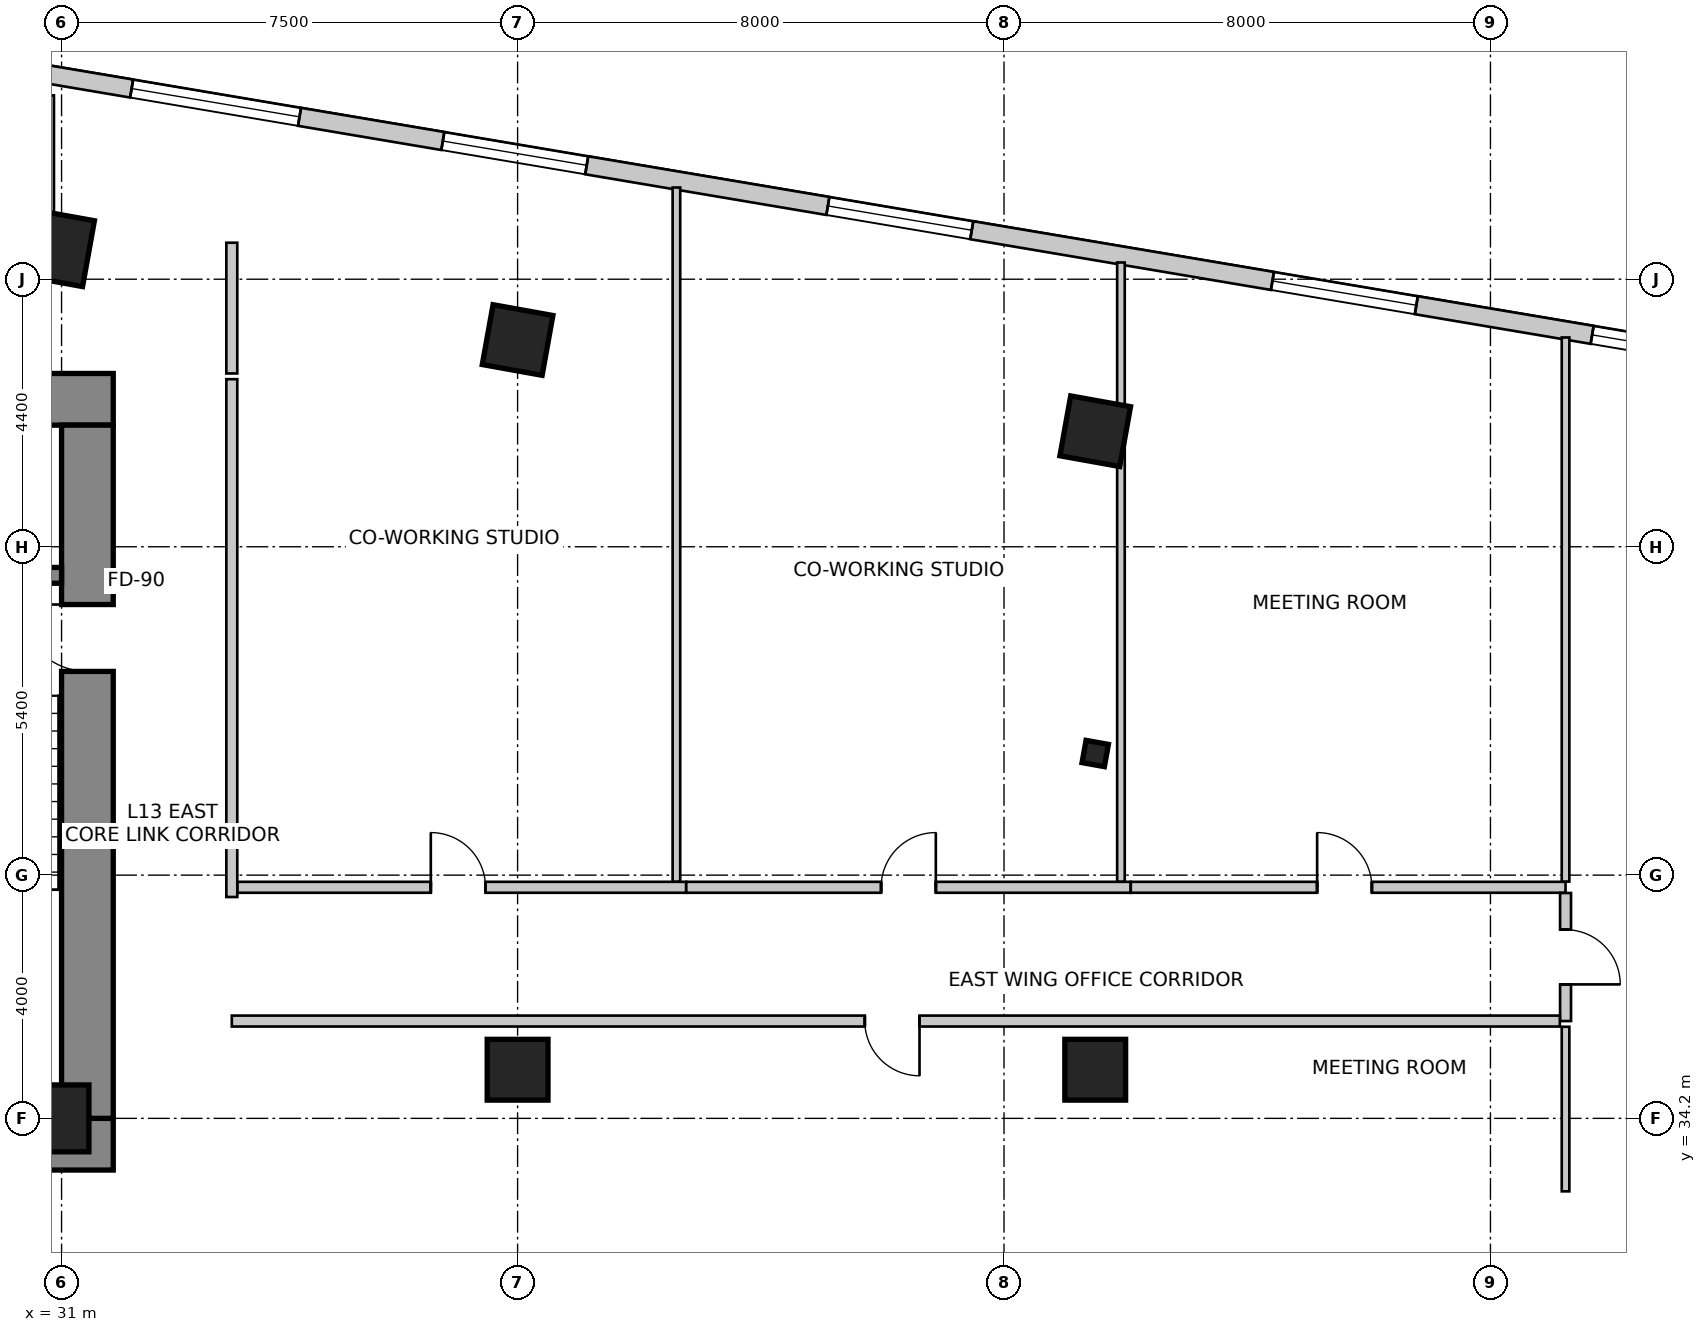
"""IFC4 building model, lengths in metres.
Left out: names, types, materials, properties, quantities, classifications, styles, units other than length and angle.
Written with IfcOpenShell. Run it as: python <this file> out.ifc"""

import sys

from ifc_helpers import new_model, si_unit, direction, frame, frame_2d, origin, origin_2d, place, context, subcontext, project, spatial, rectangle, i_section, extrude, source, transform, mapped, element, fill, save


model = new_model("IFC4")
c1 = context("Model", 3, precision=1e-05, world=origin(), true_north=direction((0.0, 1.0)))
c2 = subcontext(c1, "Body", "Model", "MODEL_VIEW")
j1 = project(units=[si_unit("LENGTHUNIT", "METRE"), si_unit("PLANEANGLEUNIT", "RADIAN")], contexts=[c1])
p1 = place(None, origin())
s1 = spatial("IfcSite", under=j1, at=p1, CompositionType="ELEMENT")
p2 = place(p1, origin())
s2 = spatial("IfcBuilding", under=s1, at=p2, CompositionType="ELEMENT")
p3 = place(p2, frame((0.0, 0.0, 55.0)))
s3 = spatial("IfcBuildingStorey", under=s2, at=p3, CompositionType="ELEMENT", Elevation=55.0)
p4 = place(p3, frame((15.75, 46.025, 0.0), z_axis=(0.0, 0.0, 1.0), x_axis=(1.0, 0.0, 0.0)))
e1 = element("IfcWall", 1, at=p4, inside=s3, PredefinedType="SHEAR", context=c2, shape_type="SweptSolid", body=[
    extrude(rectangle(XDim=16.1, YDim=0.85, at=frame_2d((8.05, 0.0))), origin(), (0.0, 0.0, 1.0), 4.0),
])
p5 = place(p3, frame((15.75, 33.775, 0.0), z_axis=(0.0, 0.0, 1.0), x_axis=(1.0, 0.0, 0.0)))
e2 = element("IfcWall", 2, at=p5, inside=s3, PredefinedType="SHEAR", context=c2, shape_type="SweptSolid", body=[
    extrude(rectangle(XDim=16.1, YDim=0.85, at=frame_2d((8.05, 0.0))), origin(), (0.0, 0.0, 1.0), 4.0),
])
m1 = source(origin(), c2, "Body", "SweptSolid", [
    extrude(rectangle(XDim=1.3, YDim=2.15, at=frame_2d((0.65, 1.075))), frame((0.0, 0.435, 0.0), z_axis=(0.0, -1.0, 0.0), x_axis=(1.0, 0.0, 0.0)), (0.0, 0.0, 1.0), 0.87),
])
p6 = place(p5, frame((10.18, 0.0, 0.0)))
e3 = element("IfcOpeningElement", 3, at=p6, cuts=e2, PredefinedType="OPENING", context=c2, shape_type="MappedRepresentation", body=[
    mapped(m1, transform((0.0, 0.0, 0.0), scale=1.0)),
])
p7 = place(p3, frame((31.425, 34.2, 0.0), z_axis=(0.0, 0.0, 1.0), x_axis=(0.0, 1.0, 0.0)))
e4 = element("IfcWall", 4, at=p7, inside=s3, PredefinedType="SHEAR", context=c2, shape_type="SweptSolid", body=[
    extrude(rectangle(XDim=11.4, YDim=0.85, at=frame_2d((5.7, 0.0))), origin(), (0.0, 0.0, 1.0), 4.0),
])
m2 = source(origin(), c2, "Body", "SweptSolid", [
    extrude(rectangle(XDim=1.1, YDim=2.15, at=frame_2d((0.55, 1.075))), frame((0.0, 0.435, 0.0), z_axis=(0.0, -1.0, 0.0), x_axis=(1.0, 0.0, 0.0)), (0.0, 0.0, 1.0), 0.87),
])
p8 = place(p7, frame((7.35, 0.0, 0.0)))
e5 = element("IfcOpeningElement", 5, at=p8, cuts=e4, PredefinedType="OPENING", context=c2, shape_type="MappedRepresentation", body=[
    mapped(m2, transform((0.0, 0.0, 0.0), scale=1.0)),
])
p9 = place(p3, frame((27.5, 43.13, 0.0), z_axis=(0.0, 0.0, 1.0), x_axis=(1.0, 0.0, 0.0)))
e6 = element("IfcWall", 6, at=p9, inside=s3, PredefinedType="SHEAR", context=c2, shape_type="SweptSolid", body=[
    extrude(rectangle(XDim=3.5, YDim=0.26, at=frame_2d((1.75, 0.0))), origin(), (0.0, 0.0, 1.0), 4.0),
])
m3 = source(origin(), c2, "Body", "SweptSolid", [
    extrude(rectangle(XDim=0.9, YDim=1.1, at=origin_2d()), origin(), (0.0, 0.0, 1.0), 4.0),
])
p10 = place(p3, frame((31.0, 48.5, 0.0), z_axis=(0.0, 0.0, 1.0), x_axis=(0.984195607969, -0.17708474032, 0.0)))
e7 = element("IfcColumn", 7, at=p10, inside=s3, PredefinedType="COLUMN", context=c2, shape_type="MappedRepresentation", body=[
    mapped(m3, transform((0.0, 0.0, 0.0), scale=1.0)),
])
m4 = source(origin(), c2, "Body", "SweptSolid", [
    extrude(rectangle(XDim=1.0, YDim=1.0, at=origin_2d()), origin(), (0.0, 0.0, 1.0), 4.0),
])
for number, where, z_axis, x_axis in (
    (8, (38.5, 47.0, 0.0), (0.0, 0.0, 1.0), (0.984, -0.177, 0.0)),
    (9, (48.0, 45.5, 0.0), (0.0, 0.0, 1.0), (0.984, -0.177, 0.0)),
):
    element("IfcColumn", number, at=place(p3, frame(where, z_axis=z_axis, x_axis=x_axis)), inside=s3, PredefinedType="COLUMN", context=c2, shape_type="MappedRepresentation", body=[
        mapped(m4, transform((0.0, 0.0, 0.0), scale=1.0)),
    ])
p11 = place(p3, frame((31.0, 34.2, 0.0), z_axis=(0.0, 0.0, 1.0), x_axis=(1.0, 0.0, 0.0)))
e10 = element("IfcColumn", 10, at=p11, inside=s3, PredefinedType="COLUMN", context=c2, shape_type="MappedRepresentation", body=[
    mapped(m3, transform((0.0, 0.0, 0.0), scale=1.0)),
])
for number, where, z_axis, x_axis in (
    (11, (38.5, 35.0, 0.0), (0.0, 0.0, 1.0), (1.0, 0.0, 0.0)),
    (12, (48.0, 35.0, 0.0), (0.0, 0.0, 1.0), (1.0, 0.0, 0.0)),
):
    element("IfcColumn", number, at=place(p3, frame(where, z_axis=z_axis, x_axis=x_axis)), inside=s3, PredefinedType="COLUMN", context=c2, shape_type="MappedRepresentation", body=[
        mapped(m4, transform((0.0, 0.0, 0.0), scale=1.0)),
    ])
m5 = source(origin(), c2, "Body", "SweptSolid", [
    extrude(i_section(OverallWidth=0.374, OverallDepth=0.372, WebThickness=0.016, FlangeThickness=0.026, FilletRadius=0.015, at=origin_2d()), origin(), (0.0, 0.0, 1.0), 4.0),
])
p12 = place(p3, frame((48.0, 40.2, 0.0), z_axis=(0.0, 0.0, 1.0), x_axis=(0.984195607969, -0.17708474032, 0.0)))
e13 = element("IfcColumn", 13, at=p12, inside=s3, PredefinedType="COLUMN", context=c2, shape_type="MappedRepresentation", body=[
    mapped(m5, transform((0.0, 0.0, 0.0), scale=1.0)),
])
p13 = place(p3, frame((58.761, 46.648, 0.0), z_axis=(0.0, 0.0, 1.0), x_axis=(-0.98607502735, 0.166301053624, 0.0)))
e14 = element("IfcWall", 14, at=p13, inside=s3, PredefinedType="SOLIDWALL", context=c2, shape_type="SweptSolid", body=[
    extrude(rectangle(XDim=37.397, YDim=0.3, at=frame_2d((18.699, 0.0))), origin(), (0.0, 0.0, 1.0), 3.75),
])
m6 = source(origin(), c2, "Body", "SweptSolid", [
    extrude(rectangle(XDim=2.1, YDim=2.0, at=frame_2d((1.05, 1.0))), frame((0.0, 0.16, 0.0), z_axis=(0.0, -1.0, 0.0), x_axis=(1.0, 0.0, 0.0)), (0.0, 0.0, 1.0), 0.32),
])
p14 = place(p13, frame((0.525, 0.0, 0.85)))
e15 = element("IfcOpeningElement", 15, at=p14, cuts=e14, PredefinedType="OPENING", context=c2, shape_type="MappedRepresentation", body=[
    mapped(m6, transform((0.0, 0.0, 0.0), scale=1.0)),
])
m7 = source(origin(), c2, "Body", "SweptSolid", [
    extrude(rectangle(XDim=2.4, YDim=2.2, at=frame_2d((1.2, 1.1))), frame((0.0, 0.16, 0.0), z_axis=(0.0, -1.0, 0.0), x_axis=(1.0, 0.0, 0.0)), (0.0, 0.0, 1.0), 0.32),
])
p15 = place(p13, frame((5.557, 0.0, 0.85)))
e16 = element("IfcOpeningElement", 16, at=p15, cuts=e14, PredefinedType="OPENING", context=c2, shape_type="MappedRepresentation", body=[
    mapped(m7, transform((0.0, 0.0, 0.0), scale=1.0)),
])
p16 = place(p13, frame((12.972, 0.0, 0.85)))
e17 = element("IfcOpeningElement", 17, at=p16, cuts=e14, PredefinedType="OPENING", context=c2, shape_type="MappedRepresentation", body=[
    mapped(m7, transform((0.0, 0.0, 0.0), scale=1.0)),
])
p17 = place(p13, frame((19.394, 0.0, 0.85)))
e18 = element("IfcOpeningElement", 18, at=p17, cuts=e14, PredefinedType="OPENING", context=c2, shape_type="MappedRepresentation", body=[
    mapped(m7, transform((0.0, 0.0, 0.0), scale=1.0)),
])
m8 = source(origin(), c2, "Body", "SweptSolid", [
    extrude(rectangle(XDim=2.8, YDim=2.4, at=frame_2d((1.4, 1.2))), frame((0.0, 0.16, 0.0), z_axis=(0.0, -1.0, 0.0), x_axis=(1.0, 0.0, 0.0)), (0.0, 0.0, 1.0), 0.32),
])
p18 = place(p13, frame((24.184, 0.0, 0.85)))
e19 = element("IfcOpeningElement", 19, at=p18, cuts=e14, PredefinedType="OPENING", context=c2, shape_type="MappedRepresentation", body=[
    mapped(m8, transform((0.0, 0.0, 0.0), scale=1.0)),
])
p19 = place(p13, frame((29.957, 0.0, 0.85)))
e20 = element("IfcOpeningElement", 20, at=p19, cuts=e14, PredefinedType="OPENING", context=c2, shape_type="MappedRepresentation", body=[
    mapped(m7, transform((0.0, 0.0, 0.0), scale=1.0)),
])
p20 = place(p13, frame((34.456, 0.0, 0.85)))
e21 = element("IfcOpeningElement", 21, at=p20, cuts=e14, PredefinedType="OPENING", context=c2, shape_type="MappedRepresentation", body=[
    mapped(m7, transform((0.0, 0.0, 0.0), scale=1.0)),
])
p21 = place(p3, frame((25.362, 48.6, 0.0), z_axis=(0.0, 0.0, 1.0), x_axis=(1.0, 0.0, 0.0)))
e22 = element("IfcWall", 22, at=p21, inside=s3, PredefinedType="PARTITIONING", context=c2, shape_type="SweptSolid", body=[
    extrude(rectangle(XDim=5.598, YDim=0.18, at=frame_2d((2.799, 0.0))), origin(), (0.0, 0.0, 1.0), 2.892),
])
m9 = source(origin(), c2, "Body", "SweptSolid", [
    extrude(rectangle(XDim=0.9, YDim=2.15, at=frame_2d((0.45, 1.075))), frame((0.0, 0.1, 0.0), z_axis=(0.0, -1.0, 0.0), x_axis=(1.0, 0.0, 0.0)), (0.0, 0.0, 1.0), 0.2),
])
p22 = place(p21, frame((2.349, 0.0, 0.0)))
e23 = element("IfcOpeningElement", 23, at=p22, cuts=e22, PredefinedType="OPENING", context=c2, shape_type="MappedRepresentation", body=[
    mapped(m9, transform((0.0, 0.0, 0.0), scale=1.0)),
])
p23 = place(p3, frame((33.8, 48.6, 0.0), z_axis=(0.0, 0.0, 1.0), x_axis=(0.0, -1.0, 0.0)))
e24 = element("IfcWall", 24, at=p23, inside=s3, PredefinedType="PARTITIONING", context=c2, shape_type="SweptSolid", body=[
    extrude(rectangle(XDim=2.15, YDim=0.18, at=frame_2d((1.075, 0.0))), origin(), (0.0, 0.0, 1.0), 2.892),
])
p24 = place(p3, frame((33.8, 46.356, 0.0), z_axis=(0.0, 0.0, 1.0), x_axis=(0.0, -1.0, 0.0)))
e25 = element("IfcWall", 25, at=p24, inside=s3, PredefinedType="PARTITIONING", context=c2, shape_type="SweptSolid", body=[
    extrude(rectangle(XDim=8.516, YDim=0.18, at=frame_2d((4.258, 0.0))), origin(), (0.0, 0.0, 1.0), 3.279),
])
p25 = place(p3, frame((33.894, 38.0, 0.0), z_axis=(0.0, 0.0, 1.0), x_axis=(1.0, 0.0, 0.0)))
e26 = element("IfcWall", 26, at=p25, inside=s3, PredefinedType="PARTITIONING", context=c2, shape_type="SweptSolid", body=[
    extrude(rectangle(XDim=7.378, YDim=0.18, at=frame_2d((3.689, 0.0))), origin(), (0.0, 0.0, 1.0), 3.125),
])
p26 = place(p25, frame((3.179, 0.0, 0.0)))
e27 = element("IfcOpeningElement", 27, at=p26, cuts=e26, PredefinedType="OPENING", context=c2, shape_type="MappedRepresentation", body=[
    mapped(m9, transform((0.0, 0.0, 0.0), scale=1.0)),
])
p27 = place(p3, frame((41.274, 38.0, 0.0), z_axis=(0.0, 0.0, 1.0), x_axis=(1.0, 0.0, 0.0)))
e28 = element("IfcWall", 28, at=p27, inside=s3, PredefinedType="PARTITIONING", context=c2, shape_type="SweptSolid", body=[
    extrude(rectangle(XDim=7.309, YDim=0.18, at=frame_2d((3.655, 0.0))), origin(), (0.0, 0.0, 1.0), 3.125),
])
p28 = place(p27, frame((3.205, 0.0, 0.0)))
e29 = element("IfcOpeningElement", 29, at=p28, cuts=e28, PredefinedType="OPENING", context=c2, shape_type="MappedRepresentation", body=[
    mapped(m9, transform((0.0, 0.0, 0.0), scale=1.0)),
])
p29 = place(p3, frame((48.585, 38.0, 0.0), z_axis=(0.0, 0.0, 1.0), x_axis=(1.0, 0.0, 0.0)))
e30 = element("IfcWall", 30, at=p29, inside=s3, PredefinedType="PARTITIONING", context=c2, shape_type="SweptSolid", body=[
    extrude(rectangle(XDim=7.15, YDim=0.18, at=frame_2d((3.575, 0.0))), origin(), (0.0, 0.0, 1.0), 3.75),
])
p30 = place(p29, frame((3.064, 0.0, 0.0)))
e31 = element("IfcOpeningElement", 31, at=p30, cuts=e30, PredefinedType="OPENING", context=c2, shape_type="MappedRepresentation", body=[
    mapped(m9, transform((0.0, 0.0, 0.0), scale=1.0)),
])
p31 = place(p3, frame((55.735, 37.906, 0.0), z_axis=(0.0, 0.0, 1.0), x_axis=(0.0, -1.0, 0.0)))
e32 = element("IfcWall", 32, at=p31, inside=s3, PredefinedType="PARTITIONING", context=c2, shape_type="SweptSolid", body=[
    extrude(rectangle(XDim=2.106, YDim=0.18, at=frame_2d((1.053, 0.0))), origin(), (0.0, 0.0, 1.0), 3.75),
])
p32 = place(p31, frame((0.603, 0.0, 0.0)))
e33 = element("IfcOpeningElement", 33, at=p32, cuts=e32, PredefinedType="OPENING", context=c2, shape_type="MappedRepresentation", body=[
    mapped(m9, transform((0.0, 0.0, 0.0), scale=1.0)),
])
p33 = place(p3, frame((55.641, 35.8, 0.0), z_axis=(0.0, 0.0, 1.0), x_axis=(-1.0, 0.0, 0.0)))
e34 = element("IfcWall", 34, at=p33, inside=s3, PredefinedType="PARTITIONING", context=c2, shape_type="SweptSolid", body=[
    extrude(rectangle(XDim=21.841, YDim=0.18, at=frame_2d((10.92, 0.0))), origin(), (0.0, 0.0, 1.0), 3.125),
])
p34 = place(p33, frame((10.531, 0.0, 0.0)))
e35 = element("IfcOpeningElement", 35, at=p34, cuts=e34, PredefinedType="OPENING", context=c2, shape_type="MappedRepresentation", body=[
    mapped(m9, transform((0.0, 0.0, 0.0), scale=1.0)),
])
p35 = place(p3, frame((41.112, 49.508, 0.0), z_axis=(0.0, 0.0, 1.0), x_axis=(0.0, -1.0, 0.0)))
e36 = element("IfcWall", 36, at=p35, inside=s3, PredefinedType="PARTITIONING", context=c2, shape_type="SweptSolid", body=[
    extrude(rectangle(XDim=11.414, YDim=0.125, at=frame_2d((5.707, 0.0))), origin(), (0.0, 0.0, 1.0), 2.892),
])
p36 = place(p3, frame((48.423, 48.275, 0.0), z_axis=(0.0, 0.0, 1.0), x_axis=(0.0, -1.0, 0.0)))
e37 = element("IfcWall", 37, at=p36, inside=s3, PredefinedType="PARTITIONING", context=c2, shape_type="SweptSolid", body=[
    extrude(rectangle(XDim=10.181, YDim=0.125, at=frame_2d((5.091, 0.0))), origin(), (0.0, 0.0, 1.0), 3.75),
])
p37 = place(p3, frame((55.735, 47.042, 0.0), z_axis=(0.0, 0.0, 1.0), x_axis=(0.0, -1.0, 0.0)))
e38 = element("IfcWall", 38, at=p37, inside=s3, PredefinedType="PARTITIONING", context=c2, shape_type="SweptSolid", body=[
    extrude(rectangle(XDim=8.948, YDim=0.125, at=frame_2d((4.474, 0.0))), origin(), (0.0, 0.0, 1.0), 3.75),
])
p38 = place(p3, frame((55.735, 33.0, 0.0), z_axis=(0.0, 0.0, 1.0), x_axis=(0.0, 1.0, 0.0)))
e39 = element("IfcWall", 39, at=p38, inside=s3, PredefinedType="PARTITIONING", context=c2, shape_type="SweptSolid", body=[
    extrude(rectangle(XDim=2.706, YDim=0.125, at=frame_2d((1.353, 0.0))), origin(), (0.0, 0.0, 1.0), 3.75),
])
p39 = place(p3, frame((30.8, 51.024, 0.0), z_axis=(0.0, 0.0, 1.0), x_axis=(0.0, -1.0, 0.0)))
e40 = element("IfcWall", 40, at=p39, inside=s3, PredefinedType="PARTITIONING", context=c2, shape_type="SweptSolid", body=[
    extrude(rectangle(XDim=2.204, YDim=0.15, at=frame_2d((1.102, 0.0))), origin(), (0.0, 0.0, 1.0), 3.75),
])
m10 = source(origin(), c2, "Body", "SweptSolid", [
    extrude(rectangle(XDim=2.1, YDim=2.0, at=frame_2d((1.05, 1.0))), frame((0.0, -0.015, 0.0), z_axis=(0.0, -1.0, 0.0), x_axis=(1.0, 0.0, 0.0)), (0.0, 0.0, 1.0), 0.06),
])
p40 = place(p14, origin())
e41 = element("IfcWindow", 41, at=p40, inside=s3, PartitioningType="SINGLE_PANEL", PredefinedType="WINDOW", context=c2, shape_type="MappedRepresentation", body=[
    mapped(m10, transform((0.0, 0.0, 0.0), scale=1.0)),
])
fill(e15, e41)
m11 = source(origin(), c2, "Body", "SweptSolid", [
    extrude(rectangle(XDim=2.4, YDim=2.2, at=frame_2d((1.2, 1.1))), frame((0.0, -0.015, 0.0), z_axis=(0.0, -1.0, 0.0), x_axis=(1.0, 0.0, 0.0)), (0.0, 0.0, 1.0), 0.06),
])
p41 = place(p15, origin())
e42 = element("IfcWindow", 42, at=p41, inside=s3, PartitioningType="SINGLE_PANEL", PredefinedType="WINDOW", context=c2, shape_type="MappedRepresentation", body=[
    mapped(m11, transform((0.0, 0.0, 0.0), scale=1.0)),
])
fill(e16, e42)
p42 = place(p16, origin())
e43 = element("IfcWindow", 43, at=p42, inside=s3, PartitioningType="SINGLE_PANEL", PredefinedType="WINDOW", context=c2, shape_type="MappedRepresentation", body=[
    mapped(m11, transform((0.0, 0.0, 0.0), scale=1.0)),
])
fill(e17, e43)
p43 = place(p17, origin())
e44 = element("IfcWindow", 44, at=p43, inside=s3, PartitioningType="SINGLE_PANEL", PredefinedType="WINDOW", context=c2, shape_type="MappedRepresentation", body=[
    mapped(m11, transform((0.0, 0.0, 0.0), scale=1.0)),
])
fill(e18, e44)
m12 = source(origin(), c2, "Body", "SweptSolid", [
    extrude(rectangle(XDim=2.8, YDim=2.4, at=frame_2d((1.4, 1.2))), frame((0.0, -0.015, 0.0), z_axis=(0.0, -1.0, 0.0), x_axis=(1.0, 0.0, 0.0)), (0.0, 0.0, 1.0), 0.06),
])
p44 = place(p18, origin())
e45 = element("IfcWindow", 45, at=p44, inside=s3, PartitioningType="SINGLE_PANEL", PredefinedType="WINDOW", context=c2, shape_type="MappedRepresentation", body=[
    mapped(m12, transform((0.0, 0.0, 0.0), scale=1.0)),
])
fill(e19, e45)
m13 = source(origin(), c2, "Body", "SweptSolid", [
    extrude(rectangle(XDim=1.1, YDim=2.15, at=frame_2d((0.55, 1.075))), frame((0.0, 0.025, 0.0), z_axis=(0.0, -1.0, 0.0), x_axis=(1.0, 0.0, 0.0)), (0.0, 0.0, 1.0), 0.05),
])
p45 = place(p8, origin())
e46 = element("IfcDoor", 46, at=p45, inside=s3, OperationType="SINGLE_SWING_RIGHT", PredefinedType="DOOR", context=c2, shape_type="MappedRepresentation", body=[
    mapped(m13, transform((0.0, 0.0, 0.0), scale=1.0)),
])
fill(e5, e46)
m14 = source(origin(), c2, "Body", "SweptSolid", [
    extrude(rectangle(XDim=0.9, YDim=2.15, at=frame_2d((0.45, 1.075))), frame((0.0, 0.025, 0.0), z_axis=(0.0, -1.0, 0.0), x_axis=(1.0, 0.0, 0.0)), (0.0, 0.0, 1.0), 0.05),
])
p46 = place(p26, origin())
e47 = element("IfcDoor", 47, at=p46, inside=s3, OperationType="SINGLE_SWING_LEFT", PredefinedType="DOOR", context=c2, shape_type="MappedRepresentation", body=[
    mapped(m14, transform((0.0, 0.0, 0.0), scale=1.0)),
])
fill(e27, e47)
p47 = place(p28, origin())
e48 = element("IfcDoor", 48, at=p47, inside=s3, OperationType="SINGLE_SWING_RIGHT", PredefinedType="DOOR", context=c2, shape_type="MappedRepresentation", body=[
    mapped(m14, transform((0.0, 0.0, 0.0), scale=1.0)),
])
fill(e29, e48)
p48 = place(p30, origin())
e49 = element("IfcDoor", 49, at=p48, inside=s3, OperationType="SINGLE_SWING_LEFT", PredefinedType="DOOR", context=c2, shape_type="MappedRepresentation", body=[
    mapped(m14, transform((0.0, 0.0, 0.0), scale=1.0)),
])
fill(e31, e49)
p49 = place(p32, origin())
e50 = element("IfcDoor", 50, at=p49, inside=s3, OperationType="SINGLE_SWING_RIGHT", PredefinedType="DOOR", context=c2, shape_type="MappedRepresentation", body=[
    mapped(m14, transform((0.0, 0.0, 0.0), scale=1.0)),
])
fill(e33, e50)
p50 = place(p34, origin())
e51 = element("IfcDoor", 51, at=p50, inside=s3, OperationType="SINGLE_SWING_LEFT", PredefinedType="DOOR", context=c2, shape_type="MappedRepresentation", body=[
    mapped(m14, transform((0.0, 0.0, 0.0), scale=1.0)),
])
fill(e35, e51)
save(model, sys.argv[1])
